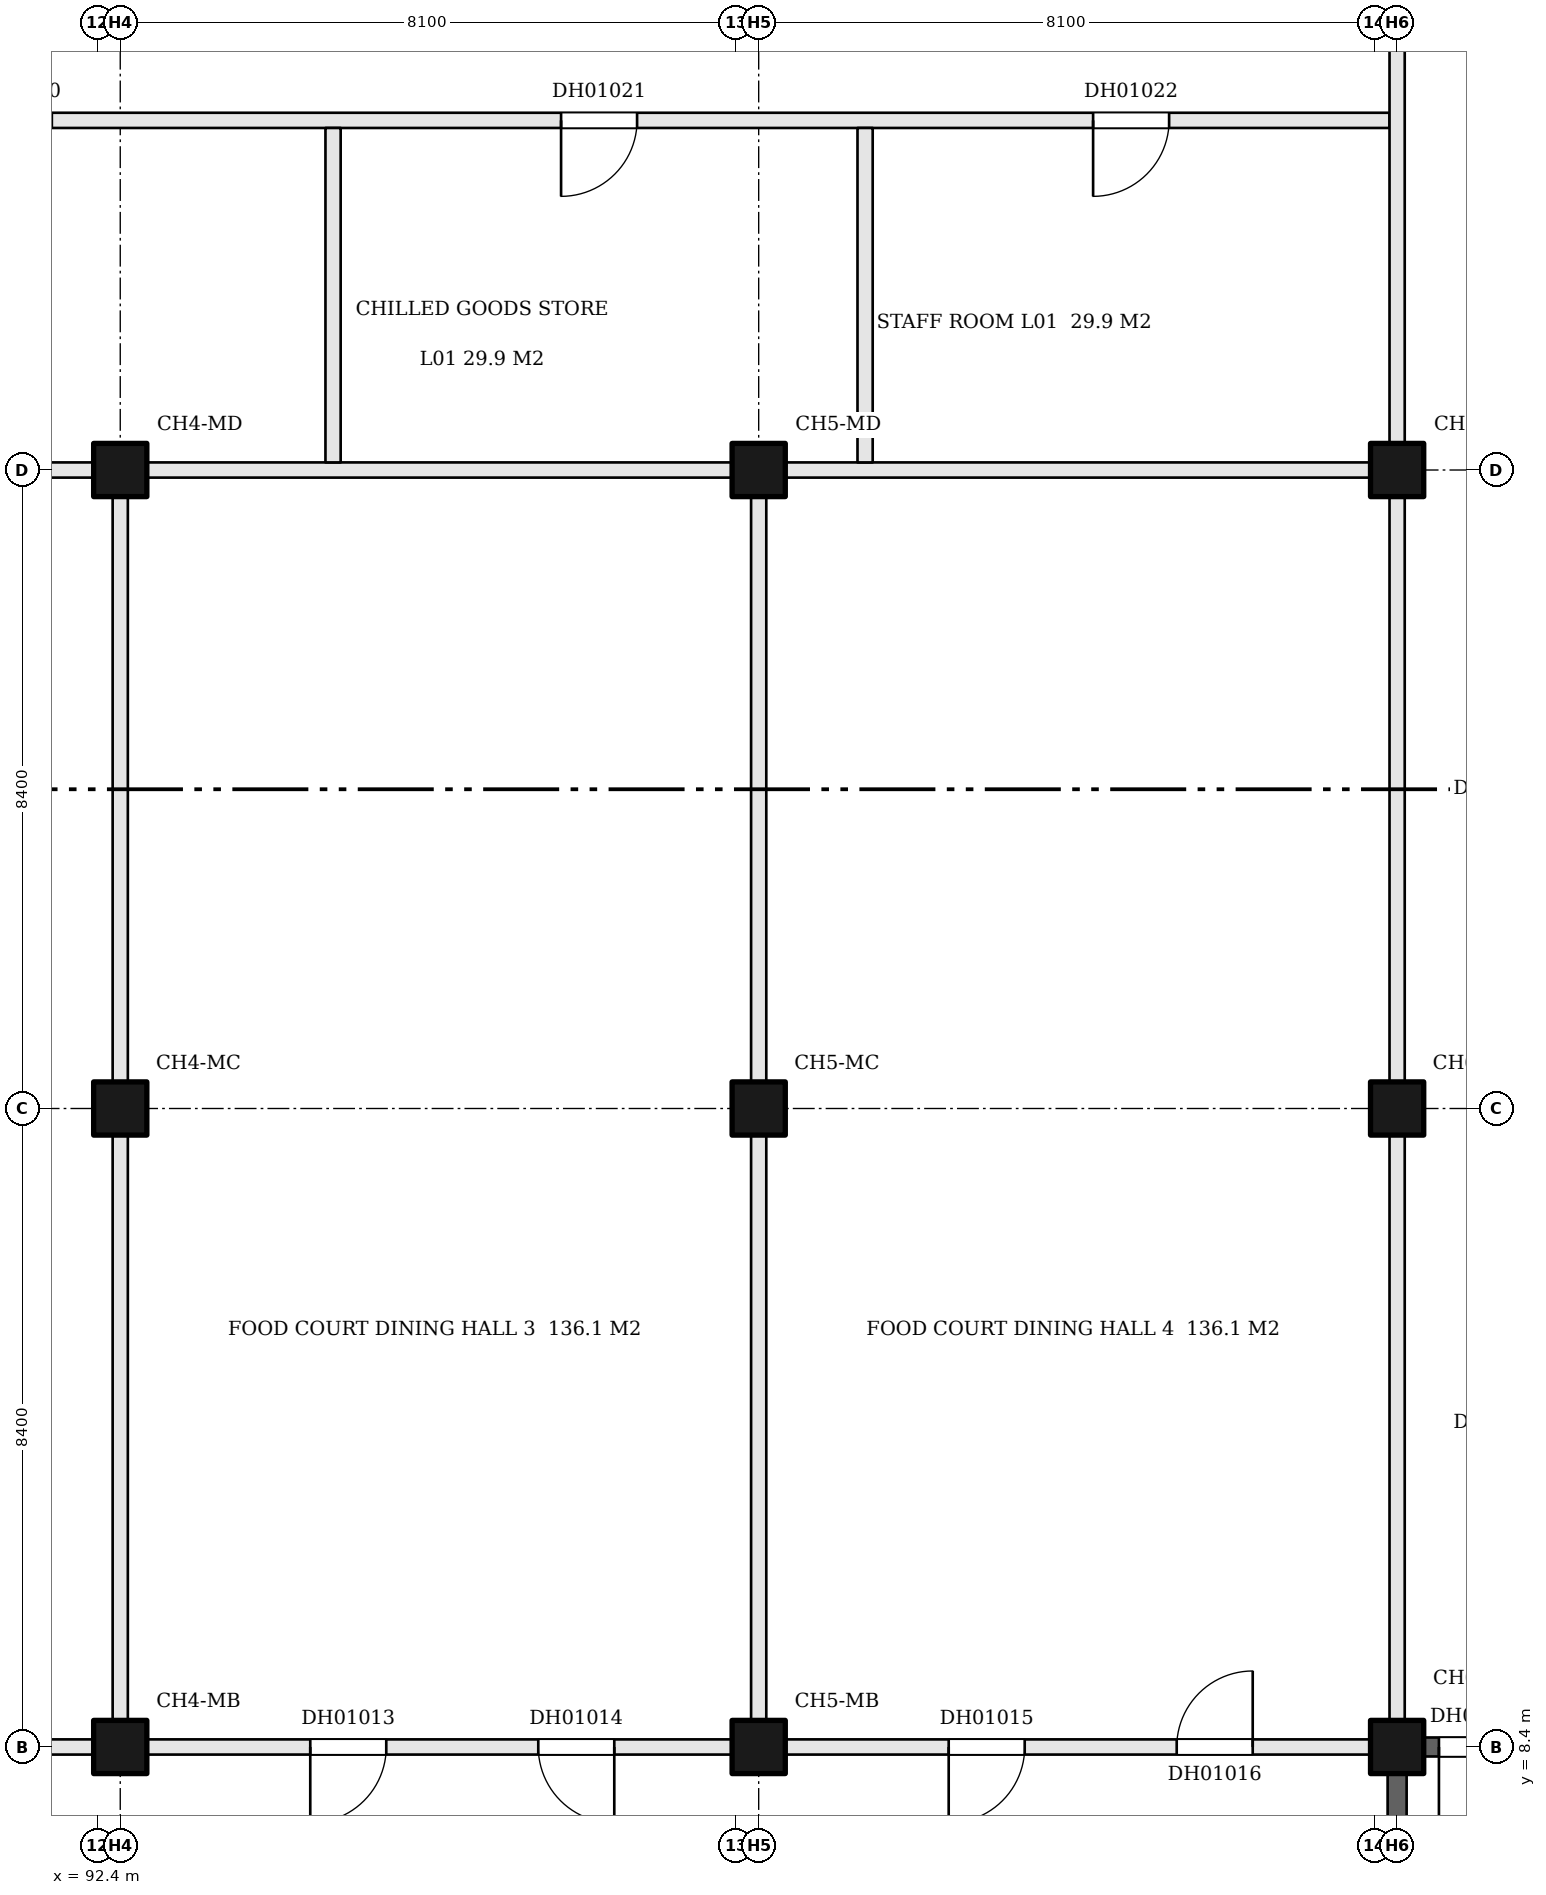
"""IFC4 building model, lengths in metres.
Left out: names, types, materials, properties, quantities, classifications, styles, units other than length and angle.
Written with IfcOpenShell. Run it as: python <this file> out.ifc"""

import sys

from ifc_helpers import new_model, si_unit, direction, frame, frame_2d, origin, origin_2d, place, context, subcontext, project, spatial, rectangle, extrude, element, fill, save


model = new_model("IFC4")
c1 = context("Model", 3, precision=1e-05, world=origin(), true_north=direction((0.0, 1.0)))
c2 = subcontext(c1, "Body", "Model", "MODEL_VIEW")
j1 = project(units=[si_unit("LENGTHUNIT", "METRE"), si_unit("PLANEANGLEUNIT", "RADIAN")], contexts=[c1])
p1 = place(None, origin())
s1 = spatial("IfcSite", under=j1, at=p1, CompositionType="ELEMENT")
p2 = place(p1, origin())
s2 = spatial("IfcBuilding", under=s1, at=p2, CompositionType="ELEMENT")
p3 = place(p2, frame((0.0, 0.0, 9.0)))
s3 = spatial("IfcBuildingStorey", under=s2, at=p3, CompositionType="ELEMENT", Elevation=9.0)
for number, where, z_axis, x_axis in (
    (1, (92.7, 8.4, 0.0), (0.0, 0.0, 1.0), (1.0, 0.0, 0.0)),
    (2, (92.7, 16.8, 0.0), (0.0, 0.0, 1.0), (1.0, 0.0, 0.0)),
    (3, (92.7, 25.2, 0.0), (0.0, 0.0, 1.0), (1.0, 0.0, 0.0)),
    (4, (101.1, 8.4, 0.0), (0.0, 0.0, 1.0), (1.0, 0.0, 0.0)),
    (5, (101.1, 16.8, 0.0), (0.0, 0.0, 1.0), (1.0, 0.0, 0.0)),
    (6, (101.1, 25.2, 0.0), (0.0, 0.0, 1.0), (1.0, 0.0, 0.0)),
    (7, (109.5, 8.4, 0.0), (0.0, 0.0, 1.0), (1.0, 0.0, 0.0)),
    (8, (109.5, 16.8, 0.0), (0.0, 0.0, 1.0), (1.0, 0.0, 0.0)),
    (9, (109.5, 25.2, 0.0), (0.0, 0.0, 1.0), (1.0, 0.0, 0.0)),
):
    element("IfcColumn", number, at=place(p3, frame(where, z_axis=z_axis, x_axis=x_axis)), inside=s3, PredefinedType="COLUMN", context=c2, shape_type="SweptSolid", body=[
        extrude(rectangle(XDim=0.7, YDim=0.7, at=origin_2d()), origin(), (0.0, 0.0, 1.0), 5.1),
    ])
p4 = place(p3, frame((84.65, 8.4, 0.0), z_axis=(0.0, 0.0, 1.0), x_axis=(1.0, 0.0, 0.0)))
e10 = element("IfcWall", 10, at=p4, inside=s3, PredefinedType="PARTITIONING", context=c2, shape_type="SweptSolid", body=[
    extrude(rectangle(XDim=7.7, YDim=0.2, at=frame_2d((3.85, 0.0))), origin(), (0.0, 0.0, 1.0), 5.1),
])
p5 = place(p4, frame((2.15, 0.0, 0.0)))
e11 = element("IfcOpeningElement", 11, at=p5, cuts=e10, PredefinedType="OPENING", context=c2, shape_type="SweptSolid", body=[
    extrude(rectangle(XDim=1.0, YDim=2.1, at=frame_2d((0.5, 1.05))), frame((0.0, 0.11, 0.0), z_axis=(0.0, -1.0, 0.0), x_axis=(1.0, 0.0, 0.0)), (0.0, 0.0, 1.0), 0.22),
])
p6 = place(p4, frame((5.15, 0.0, 0.0)))
e12 = element("IfcOpeningElement", 12, at=p6, cuts=e10, PredefinedType="OPENING", context=c2, shape_type="SweptSolid", body=[
    extrude(rectangle(XDim=1.0, YDim=2.1, at=frame_2d((0.5, 1.05))), frame((0.0, 0.11, 0.0), z_axis=(0.0, -1.0, 0.0), x_axis=(1.0, 0.0, 0.0)), (0.0, 0.0, 1.0), 0.22),
])
p7 = place(p3, frame((93.05, 8.4, 0.0), z_axis=(0.0, 0.0, 1.0), x_axis=(1.0, 0.0, 0.0)))
e13 = element("IfcWall", 13, at=p7, inside=s3, PredefinedType="PARTITIONING", context=c2, shape_type="SweptSolid", body=[
    extrude(rectangle(XDim=7.7, YDim=0.2, at=frame_2d((3.85, 0.0))), origin(), (0.0, 0.0, 1.0), 5.1),
])
p8 = place(p7, frame((2.15, 0.0, 0.0)))
e14 = element("IfcOpeningElement", 14, at=p8, cuts=e13, PredefinedType="OPENING", context=c2, shape_type="SweptSolid", body=[
    extrude(rectangle(XDim=1.0, YDim=2.1, at=frame_2d((0.5, 1.05))), frame((0.0, 0.11, 0.0), z_axis=(0.0, -1.0, 0.0), x_axis=(1.0, 0.0, 0.0)), (0.0, 0.0, 1.0), 0.22),
])
p9 = place(p7, frame((5.15, 0.0, 0.0)))
e15 = element("IfcOpeningElement", 15, at=p9, cuts=e13, PredefinedType="OPENING", context=c2, shape_type="SweptSolid", body=[
    extrude(rectangle(XDim=1.0, YDim=2.1, at=frame_2d((0.5, 1.05))), frame((0.0, 0.11, 0.0), z_axis=(0.0, -1.0, 0.0), x_axis=(1.0, 0.0, 0.0)), (0.0, 0.0, 1.0), 0.22),
])
p10 = place(p3, frame((101.45, 8.4, 0.0), z_axis=(0.0, 0.0, 1.0), x_axis=(1.0, 0.0, 0.0)))
e16 = element("IfcWall", 16, at=p10, inside=s3, PredefinedType="PARTITIONING", context=c2, shape_type="SweptSolid", body=[
    extrude(rectangle(XDim=7.7, YDim=0.2, at=frame_2d((3.85, 0.0))), origin(), (0.0, 0.0, 1.0), 5.1),
])
p11 = place(p10, frame((2.15, 0.0, 0.0)))
e17 = element("IfcOpeningElement", 17, at=p11, cuts=e16, PredefinedType="OPENING", context=c2, shape_type="SweptSolid", body=[
    extrude(rectangle(XDim=1.0, YDim=2.1, at=frame_2d((0.5, 1.05))), frame((0.0, 0.11, 0.0), z_axis=(0.0, -1.0, 0.0), x_axis=(1.0, 0.0, 0.0)), (0.0, 0.0, 1.0), 0.22),
])
p12 = place(p10, frame((5.15, 0.0, 0.0)))
e18 = element("IfcOpeningElement", 18, at=p12, cuts=e16, PredefinedType="OPENING", context=c2, shape_type="SweptSolid", body=[
    extrude(rectangle(XDim=1.0, YDim=2.1, at=frame_2d((0.5, 1.05))), frame((0.0, 0.11, 0.0), z_axis=(0.0, -1.0, 0.0), x_axis=(1.0, 0.0, 0.0)), (0.0, 0.0, 1.0), 0.22),
])
p13 = place(p3, frame((109.85, 8.4, 0.0), z_axis=(0.0, 0.0, 1.0), x_axis=(1.0, 0.0, 0.0)))
e19 = element("IfcWall", 19, at=p13, inside=s3, PredefinedType="SHEAR", context=c2, shape_type="SweptSolid", body=[
    extrude(rectangle(XDim=7.1, YDim=0.25, at=frame_2d((3.55, 0.0))), origin(), (0.0, 0.0, 1.0), 5.1),
])
p14 = place(p13, frame((0.2, 0.0, 0.0)))
e20 = element("IfcOpeningElement", 20, at=p14, cuts=e19, PredefinedType="OPENING", context=c2, shape_type="SweptSolid", body=[
    extrude(rectangle(XDim=1.0, YDim=2.1, at=frame_2d((0.5, 1.05))), frame((0.0, 0.135, 0.0), z_axis=(0.0, -1.0, 0.0), x_axis=(1.0, 0.0, 0.0)), (0.0, 0.0, 1.0), 0.27),
])
p15 = place(p3, frame((84.65, 25.2, 0.0), z_axis=(0.0, 0.0, 1.0), x_axis=(1.0, 0.0, 0.0)))
e21 = element("IfcWall", 21, at=p15, inside=s3, PredefinedType="PARTITIONING", context=c2, shape_type="SweptSolid", body=[
    extrude(rectangle(XDim=7.7, YDim=0.2, at=frame_2d((3.85, 0.0))), origin(), (0.0, 0.0, 1.0), 5.1),
])
for number, where, z_axis, x_axis in (
    (22, (93.05, 25.2, 0.0), (0.0, 0.0, 1.0), (1.0, 0.0, 0.0)),
    (23, (101.45, 25.2, 0.0), (0.0, 0.0, 1.0), (1.0, 0.0, 0.0)),
):
    element("IfcWall", number, at=place(p3, frame(where, z_axis=z_axis, x_axis=x_axis)), inside=s3, PredefinedType="PARTITIONING", context=c2, shape_type="SweptSolid", body=[
        extrude(rectangle(XDim=7.7, YDim=0.2, at=frame_2d((3.85, 0.0))), origin(), (0.0, 0.0, 1.0), 5.1),
    ])
p16 = place(p3, frame((76.025, 29.8, 0.0), z_axis=(0.0, 0.0, 1.0), x_axis=(1.0, 0.0, 0.0)))
e24 = element("IfcWall", 24, at=p16, inside=s3, PredefinedType="PARTITIONING", context=c2, shape_type="SweptSolid", body=[
    extrude(rectangle(XDim=33.375, YDim=0.2, at=frame_2d((16.688, 0.0))), origin(), (0.0, 0.0, 1.0), 5.1),
])
p17 = place(p16, frame((1.538, 0.0, 0.0)))
e25 = element("IfcOpeningElement", 25, at=p17, cuts=e24, PredefinedType="OPENING", context=c2, shape_type="SweptSolid", body=[
    extrude(rectangle(XDim=1.0, YDim=2.1, at=frame_2d((0.5, 1.05))), frame((0.0, 0.11, 0.0), z_axis=(0.0, -1.0, 0.0), x_axis=(1.0, 0.0, 0.0)), (0.0, 0.0, 1.0), 0.22),
])
p18 = place(p16, frame((5.675, 0.0, 0.0)))
e26 = element("IfcOpeningElement", 26, at=p18, cuts=e24, PredefinedType="OPENING", context=c2, shape_type="SweptSolid", body=[
    extrude(rectangle(XDim=1.0, YDim=2.1, at=frame_2d((0.5, 1.05))), frame((0.0, 0.11, 0.0), z_axis=(0.0, -1.0, 0.0), x_axis=(1.0, 0.0, 0.0)), (0.0, 0.0, 1.0), 0.22),
])
p19 = place(p16, frame((9.175, 0.0, 0.0)))
e27 = element("IfcOpeningElement", 27, at=p19, cuts=e24, PredefinedType="OPENING", context=c2, shape_type="SweptSolid", body=[
    extrude(rectangle(XDim=1.0, YDim=2.1, at=frame_2d((0.5, 1.05))), frame((0.0, 0.11, 0.0), z_axis=(0.0, -1.0, 0.0), x_axis=(1.0, 0.0, 0.0)), (0.0, 0.0, 1.0), 0.22),
])
p20 = place(p16, frame((14.775, 0.0, 0.0)))
e28 = element("IfcOpeningElement", 28, at=p20, cuts=e24, PredefinedType="OPENING", context=c2, shape_type="SweptSolid", body=[
    extrude(rectangle(XDim=1.0, YDim=2.1, at=frame_2d((0.5, 1.05))), frame((0.0, 0.11, 0.0), z_axis=(0.0, -1.0, 0.0), x_axis=(1.0, 0.0, 0.0)), (0.0, 0.0, 1.0), 0.22),
])
p21 = place(p16, frame((22.475, 0.0, 0.0)))
e29 = element("IfcOpeningElement", 29, at=p21, cuts=e24, PredefinedType="OPENING", context=c2, shape_type="SweptSolid", body=[
    extrude(rectangle(XDim=1.0, YDim=2.1, at=frame_2d((0.5, 1.05))), frame((0.0, 0.11, 0.0), z_axis=(0.0, -1.0, 0.0), x_axis=(1.0, 0.0, 0.0)), (0.0, 0.0, 1.0), 0.22),
])
p22 = place(p16, frame((29.475, 0.0, 0.0)))
e30 = element("IfcOpeningElement", 30, at=p22, cuts=e24, PredefinedType="OPENING", context=c2, shape_type="SweptSolid", body=[
    extrude(rectangle(XDim=1.0, YDim=2.1, at=frame_2d((0.5, 1.05))), frame((0.0, 0.11, 0.0), z_axis=(0.0, -1.0, 0.0), x_axis=(1.0, 0.0, 0.0)), (0.0, 0.0, 1.0), 0.22),
])
p23 = place(p3, frame((92.7, 8.75, 0.0), z_axis=(0.0, 0.0, 1.0), x_axis=(0.0, 1.0, 0.0)))
e31 = element("IfcWall", 31, at=p23, inside=s3, PredefinedType="PARTITIONING", context=c2, shape_type="SweptSolid", body=[
    extrude(rectangle(XDim=7.7, YDim=0.2, at=frame_2d((3.85, 0.0))), origin(), (0.0, 0.0, 1.0), 5.1),
])
p24 = place(p3, frame((92.7, 17.15, 0.0), z_axis=(0.0, 0.0, 1.0), x_axis=(0.0, 1.0, 0.0)))
e32 = element("IfcWall", 32, at=p24, inside=s3, PredefinedType="PARTITIONING", context=c2, shape_type="SweptSolid", body=[
    extrude(rectangle(XDim=7.7, YDim=0.2, at=frame_2d((3.85, 0.0))), origin(), (0.0, 0.0, 1.0), 5.1),
])
p25 = place(p3, frame((95.5, 25.3, 0.0), z_axis=(0.0, 0.0, 1.0), x_axis=(0.0, 1.0, 0.0)))
e33 = element("IfcWall", 33, at=p25, inside=s3, PredefinedType="PARTITIONING", context=c2, shape_type="SweptSolid", body=[
    extrude(rectangle(XDim=4.4, YDim=0.2, at=frame_2d((2.2, 0.0))), origin(), (0.0, 0.0, 1.0), 5.1),
])
p26 = place(p3, frame((101.1, 8.75, 0.0), z_axis=(0.0, 0.0, 1.0), x_axis=(0.0, 1.0, 0.0)))
e34 = element("IfcWall", 34, at=p26, inside=s3, PredefinedType="PARTITIONING", context=c2, shape_type="SweptSolid", body=[
    extrude(rectangle(XDim=7.7, YDim=0.2, at=frame_2d((3.85, 0.0))), origin(), (0.0, 0.0, 1.0), 5.1),
])
p27 = place(p3, frame((101.1, 17.15, 0.0), z_axis=(0.0, 0.0, 1.0), x_axis=(0.0, 1.0, 0.0)))
e35 = element("IfcWall", 35, at=p27, inside=s3, PredefinedType="PARTITIONING", context=c2, shape_type="SweptSolid", body=[
    extrude(rectangle(XDim=7.7, YDim=0.2, at=frame_2d((3.85, 0.0))), origin(), (0.0, 0.0, 1.0), 5.1),
])
p28 = place(p3, frame((102.5, 25.3, 0.0), z_axis=(0.0, 0.0, 1.0), x_axis=(0.0, 1.0, 0.0)))
e36 = element("IfcWall", 36, at=p28, inside=s3, PredefinedType="PARTITIONING", context=c2, shape_type="SweptSolid", body=[
    extrude(rectangle(XDim=4.4, YDim=0.2, at=frame_2d((2.2, 0.0))), origin(), (0.0, 0.0, 1.0), 5.1),
])
p29 = place(p3, frame((109.5, 0.95, 0.0), z_axis=(0.0, 0.0, 1.0), x_axis=(0.0, 1.0, 0.0)))
e37 = element("IfcWall", 37, at=p29, inside=s3, PredefinedType="SHEAR", context=c2, shape_type="SweptSolid", body=[
    extrude(rectangle(XDim=7.1, YDim=0.25, at=frame_2d((3.55, 0.0))), origin(), (0.0, 0.0, 1.0), 5.1),
])
p30 = place(p29, frame((4.25, 0.0, 0.0)))
e38 = element("IfcOpeningElement", 38, at=p30, cuts=e37, PredefinedType="OPENING", context=c2, shape_type="SweptSolid", body=[
    extrude(rectangle(XDim=1.4, YDim=2.1, at=frame_2d((0.7, 1.05))), frame((0.0, 0.135, 0.0), z_axis=(0.0, -1.0, 0.0), x_axis=(1.0, 0.0, 0.0)), (0.0, 0.0, 1.0), 0.27),
])
p31 = place(p3, frame((109.5, 8.75, 0.0), z_axis=(0.0, 0.0, 1.0), x_axis=(0.0, 1.0, 0.0)))
e39 = element("IfcWall", 39, at=p31, inside=s3, PredefinedType="PARTITIONING", context=c2, shape_type="SweptSolid", body=[
    extrude(rectangle(XDim=7.7, YDim=0.2, at=frame_2d((3.85, 0.0))), origin(), (0.0, 0.0, 1.0), 5.1),
])
p32 = place(p3, frame((109.5, 17.15, 0.0), z_axis=(0.0, 0.0, 1.0), x_axis=(0.0, 1.0, 0.0)))
e40 = element("IfcWall", 40, at=p32, inside=s3, PredefinedType="PARTITIONING", context=c2, shape_type="SweptSolid", body=[
    extrude(rectangle(XDim=7.7, YDim=0.2, at=frame_2d((3.85, 0.0))), origin(), (0.0, 0.0, 1.0), 5.1),
])
p33 = place(p3, frame((109.5, 25.55, 0.0), z_axis=(0.0, 0.0, 1.0), x_axis=(0.0, 1.0, 0.0)))
e41 = element("IfcWall", 41, at=p33, inside=s3, PredefinedType="PARTITIONING", context=c2, shape_type="SweptSolid", body=[
    extrude(rectangle(XDim=7.1, YDim=0.2, at=frame_2d((3.55, 0.0))), origin(), (0.0, 0.0, 1.0), 5.1),
])
p34 = place(p33, frame((5.45, 0.0, 0.0)))
e42 = element("IfcOpeningElement", 42, at=p34, cuts=e41, PredefinedType="OPENING", context=c2, shape_type="SweptSolid", body=[
    extrude(rectangle(XDim=1.4, YDim=2.1, at=frame_2d((0.7, 1.05))), frame((0.0, 0.11, 0.0), z_axis=(0.0, -1.0, 0.0), x_axis=(1.0, 0.0, 0.0)), (0.0, 0.0, 1.0), 0.22),
])
p35 = place(p8, frame((1.0, 0.0, 0.0), z_axis=(0.0, 0.0, 1.0), x_axis=(-1.0, 0.0, 0.0)))
e43 = element("IfcDoor", 43, at=p35, inside=s3, OperationType="SINGLE_SWING_RIGHT", PredefinedType="DOOR", context=c2, shape_type="SweptSolid", body=[
    extrude(rectangle(XDim=1.0, YDim=2.1, at=frame_2d((0.5, 1.05))), frame((0.0, 0.025, 0.0), z_axis=(0.0, -1.0, 0.0), x_axis=(1.0, 0.0, 0.0)), (0.0, 0.0, 1.0), 0.05),
])
fill(e14, e43)
p36 = place(p9, frame((1.0, 0.0, 0.0), z_axis=(0.0, 0.0, 1.0), x_axis=(-1.0, 0.0, 0.0)))
e44 = element("IfcDoor", 44, at=p36, inside=s3, OperationType="SINGLE_SWING_LEFT", PredefinedType="DOOR", context=c2, shape_type="SweptSolid", body=[
    extrude(rectangle(XDim=1.0, YDim=2.1, at=frame_2d((0.5, 1.05))), frame((0.0, 0.025, 0.0), z_axis=(0.0, -1.0, 0.0), x_axis=(1.0, 0.0, 0.0)), (0.0, 0.0, 1.0), 0.05),
])
fill(e15, e44)
p37 = place(p11, frame((1.0, 0.0, 0.0), z_axis=(0.0, 0.0, 1.0), x_axis=(-1.0, 0.0, 0.0)))
e45 = element("IfcDoor", 45, at=p37, inside=s3, OperationType="SINGLE_SWING_RIGHT", PredefinedType="DOOR", context=c2, shape_type="SweptSolid", body=[
    extrude(rectangle(XDim=1.0, YDim=2.1, at=frame_2d((0.5, 1.05))), frame((0.0, 0.025, 0.0), z_axis=(0.0, -1.0, 0.0), x_axis=(1.0, 0.0, 0.0)), (0.0, 0.0, 1.0), 0.05),
])
fill(e17, e45)
p38 = place(p12, origin())
e46 = element("IfcDoor", 46, at=p38, inside=s3, OperationType="SINGLE_SWING_RIGHT", PredefinedType="DOOR", context=c2, shape_type="SweptSolid", body=[
    extrude(rectangle(XDim=1.0, YDim=2.1, at=frame_2d((0.5, 1.05))), frame((0.0, 0.025, 0.0), z_axis=(0.0, -1.0, 0.0), x_axis=(1.0, 0.0, 0.0)), (0.0, 0.0, 1.0), 0.05),
])
fill(e18, e46)
p39 = place(p21, frame((1.0, 0.0, 0.0), z_axis=(0.0, 0.0, 1.0), x_axis=(-1.0, 0.0, 0.0)))
e47 = element("IfcDoor", 47, at=p39, inside=s3, OperationType="SINGLE_SWING_RIGHT", PredefinedType="DOOR", context=c2, shape_type="SweptSolid", body=[
    extrude(rectangle(XDim=1.0, YDim=2.1, at=frame_2d((0.5, 1.05))), frame((0.0, 0.025, 0.0), z_axis=(0.0, -1.0, 0.0), x_axis=(1.0, 0.0, 0.0)), (0.0, 0.0, 1.0), 0.05),
])
fill(e29, e47)
p40 = place(p22, frame((1.0, 0.0, 0.0), z_axis=(0.0, 0.0, 1.0), x_axis=(-1.0, 0.0, 0.0)))
e48 = element("IfcDoor", 48, at=p40, inside=s3, OperationType="SINGLE_SWING_RIGHT", PredefinedType="DOOR", context=c2, shape_type="SweptSolid", body=[
    extrude(rectangle(XDim=1.0, YDim=2.1, at=frame_2d((0.5, 1.05))), frame((0.0, 0.025, 0.0), z_axis=(0.0, -1.0, 0.0), x_axis=(1.0, 0.0, 0.0)), (0.0, 0.0, 1.0), 0.05),
])
fill(e30, e48)
p41 = place(p14, frame((1.0, 0.0, 0.0), z_axis=(0.0, 0.0, 1.0), x_axis=(-1.0, 0.0, 0.0)))
e49 = element("IfcDoor", 49, at=p41, inside=s3, OperationType="SINGLE_SWING_RIGHT", PredefinedType="DOOR", context=c2, shape_type="SweptSolid", body=[
    extrude(rectangle(XDim=1.0, YDim=2.1, at=frame_2d((0.5, 1.05))), frame((0.0, 0.025, 0.0), z_axis=(0.0, -1.0, 0.0), x_axis=(1.0, 0.0, 0.0)), (0.0, 0.0, 1.0), 0.05),
])
fill(e20, e49)
save(model, sys.argv[1])
